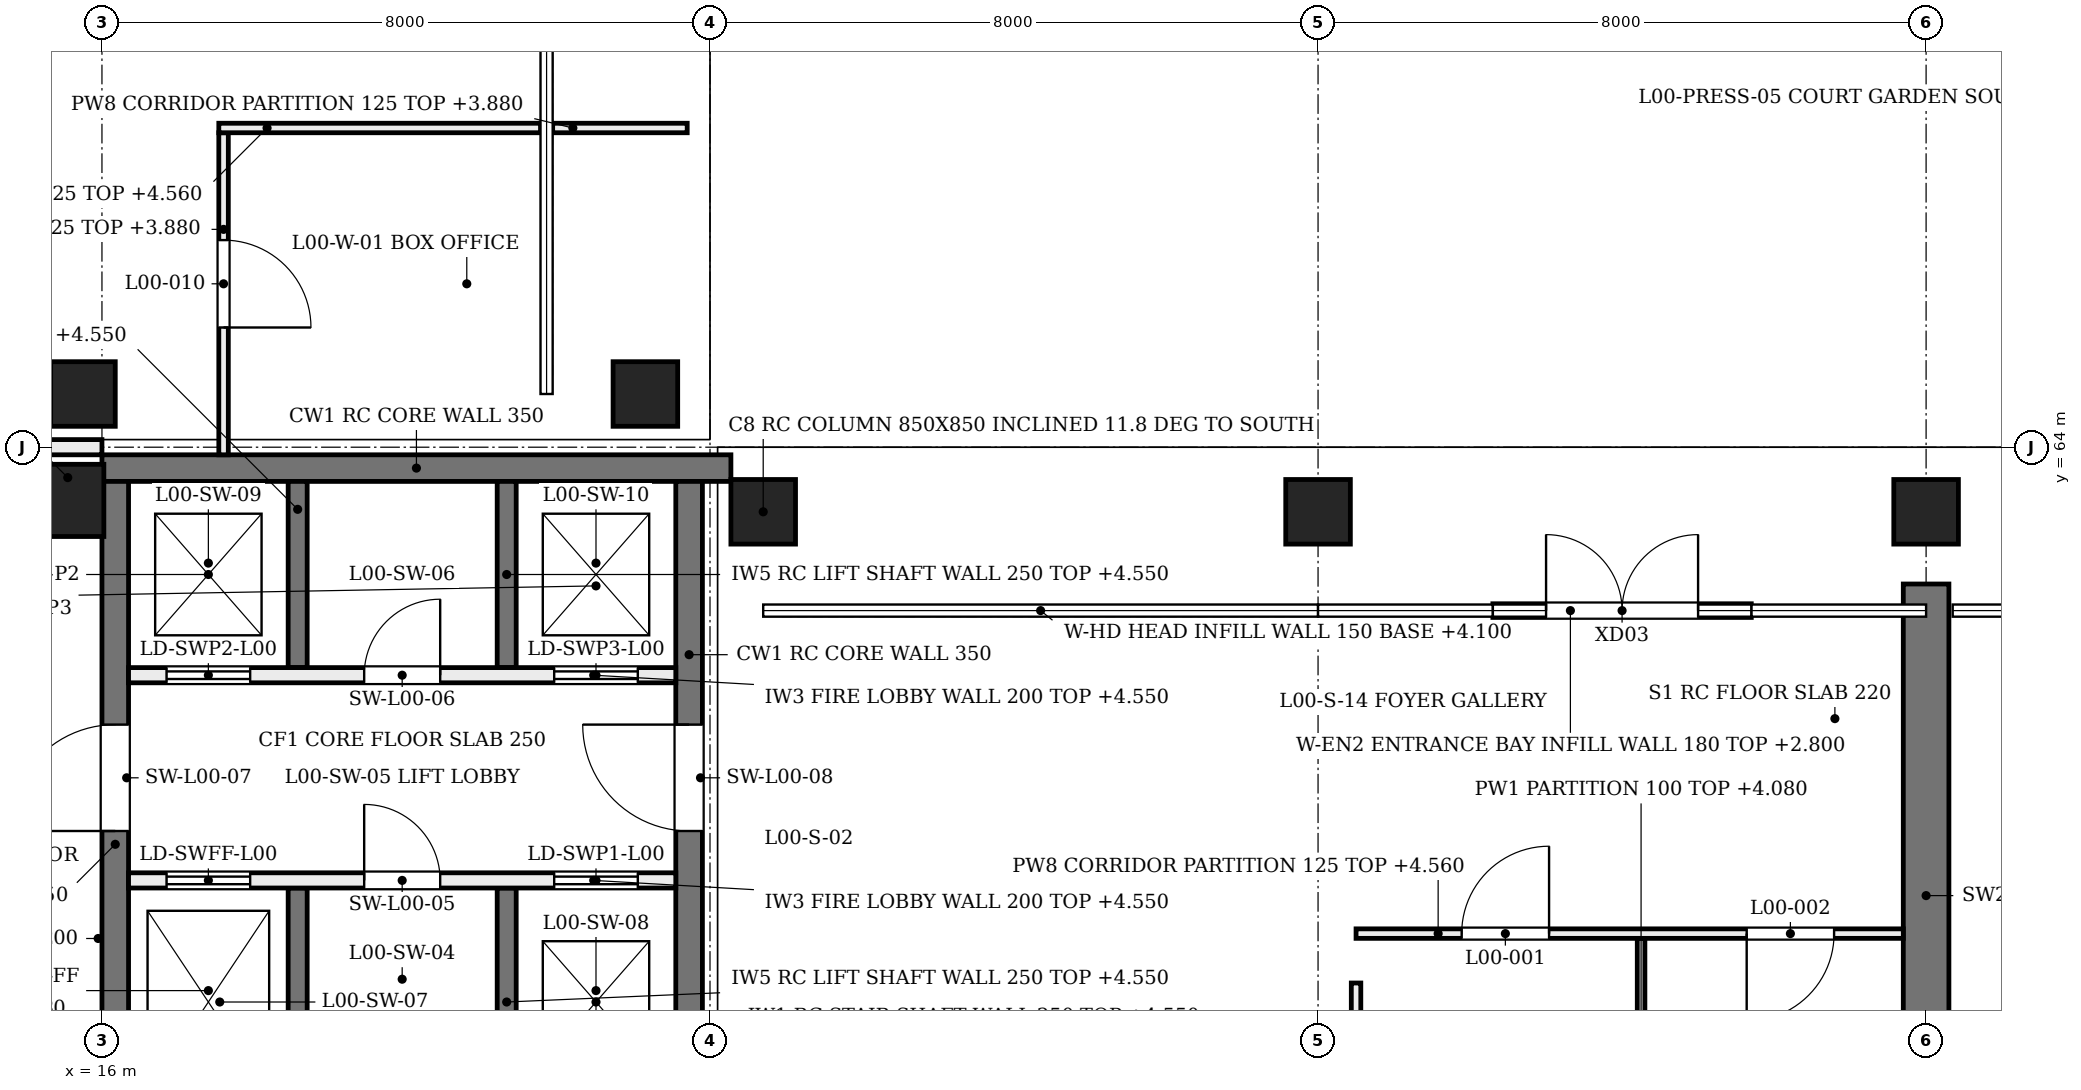
"""IFC4 building model, lengths in metres.
Left out: names, types, materials, properties, quantities, classifications, styles, units other than length and angle.
Written with IfcOpenShell. Run it as: python <this file> out.ifc"""

import sys

from ifc_helpers import new_model, si_unit, direction, frame, frame_2d, origin, origin_2d, place, context, subcontext, project, spatial, rectangle, extrude, element, fill, save


model = new_model("IFC4")
c1 = context("Model", 3, precision=1e-05, world=origin(), true_north=direction((0.0, 1.0)))
c2 = subcontext(c1, "Body", "Model", "MODEL_VIEW")
j1 = project(units=[si_unit("LENGTHUNIT", "METRE"), si_unit("PLANEANGLEUNIT", "RADIAN")], contexts=[c1])
p1 = place(None, origin())
s1 = spatial("IfcSite", under=j1, at=p1, CompositionType="ELEMENT")
p2 = place(p1, origin())
s2 = spatial("IfcBuilding", under=s1, at=p2, CompositionType="ELEMENT")
p3 = place(p2, origin())
s3 = spatial("IfcBuildingStorey", under=s2, at=p3, CompositionType="ELEMENT", Elevation=0.0)
p4 = place(p3, frame((40.0, 49.2, 0.0), z_axis=(0.0, 0.0, 1.0), x_axis=(0.0, 1.0, 0.0)))
e1 = element("IfcWall", 1, at=p4, inside=s3, PredefinedType="SHEAR", context=c2, shape_type="SweptSolid", body=[
    extrude(rectangle(XDim=13.0, YDim=0.6, at=frame_2d((6.5, 0.0))), origin(), (0.0, 0.0, 1.0), 4.58),
])
p5 = place(p3, frame((16.0, 63.725, 0.0), z_axis=(0.0, 0.0, 1.0), x_axis=(1.0, 0.0, 0.0)))
e2 = element("IfcWall", 2, at=p5, inside=s3, PredefinedType="SHEAR", context=c2, shape_type="SweptSolid", body=[
    extrude(rectangle(XDim=8.275, YDim=0.35, at=frame_2d((4.137, 0.0))), origin(), (0.0, 0.0, 1.0), 4.58),
])
p6 = place(p3, frame((16.175, 48.35, 0.0), z_axis=(0.0, 0.0, 1.0), x_axis=(0.0, 1.0, 0.0)))
e3 = element("IfcWall", 3, at=p6, inside=s3, PredefinedType="SHEAR", context=c2, shape_type="SweptSolid", body=[
    extrude(rectangle(XDim=15.2, YDim=0.35, at=frame_2d((7.6, 0.0))), origin(), (0.0, 0.0, 1.0), 4.58),
])
p7 = place(p6, frame((0.95, 0.0, 0.0)))
e4 = element("IfcOpeningElement", 4, at=p7, cuts=e3, PredefinedType="OPENING", context=c2, shape_type="SweptSolid", body=[
    extrude(rectangle(XDim=1.0, YDim=2.1, at=frame_2d((0.5, 1.05))), frame((0.0, 0.185, 0.0), z_axis=(0.0, -1.0, 0.0), x_axis=(1.0, 0.0, 0.0)), (0.0, 0.0, 1.0), 0.37),
])
p8 = place(p6, frame((10.6, 0.0, 0.0)))
e5 = element("IfcOpeningElement", 5, at=p8, cuts=e3, PredefinedType="OPENING", context=c2, shape_type="SweptSolid", body=[
    extrude(rectangle(XDim=1.4, YDim=2.1, at=frame_2d((0.7, 1.05))), frame((0.0, 0.185, 0.0), z_axis=(0.0, -1.0, 0.0), x_axis=(1.0, 0.0, 0.0)), (0.0, 0.0, 1.0), 0.37),
])
p9 = place(p3, frame((23.725, 48.35, 0.0), z_axis=(0.0, 0.0, 1.0), x_axis=(0.0, 1.0, 0.0)))
e6 = element("IfcWall", 6, at=p9, inside=s3, PredefinedType="SHEAR", context=c2, shape_type="SweptSolid", body=[
    extrude(rectangle(XDim=15.2, YDim=0.35, at=frame_2d((7.6, 0.0))), origin(), (0.0, 0.0, 1.0), 4.58),
])
p10 = place(p9, frame((0.95, 0.0, 0.0)))
e7 = element("IfcOpeningElement", 7, at=p10, cuts=e6, PredefinedType="OPENING", context=c2, shape_type="SweptSolid", body=[
    extrude(rectangle(XDim=1.0, YDim=2.1, at=frame_2d((0.5, 1.05))), frame((0.0, 0.185, 0.0), z_axis=(0.0, -1.0, 0.0), x_axis=(1.0, 0.0, 0.0)), (0.0, 0.0, 1.0), 0.37),
])
p11 = place(p9, frame((10.6, 0.0, 0.0)))
e8 = element("IfcOpeningElement", 8, at=p11, cuts=e6, PredefinedType="OPENING", context=c2, shape_type="SweptSolid", body=[
    extrude(rectangle(XDim=1.4, YDim=2.1, at=frame_2d((0.7, 1.05))), frame((0.0, 0.185, 0.0), z_axis=(0.0, -1.0, 0.0), x_axis=(1.0, 0.0, 0.0)), (0.0, 0.0, 1.0), 0.37),
])
p12 = place(p3, frame((15.55, 63.3, 0.0), z_axis=(0.0, 0.0, 1.0), x_axis=(1.0, 0.0, 0.0)))
e9 = element("IfcColumn", 9, at=p12, inside=s3, PredefinedType="COLUMN", context=c2, shape_type="SweptSolid", body=[
    extrude(rectangle(XDim=0.95, YDim=0.95, at=origin_2d()), origin(), (0.0, 0.0, 1.0), 4.8),
])
for number, where, z_axis, x_axis in (
    (10, (24.7, 63.4, 0.0), (0.0, -0.204, 0.979), (1.0, 0.0, 0.0)),
    (11, (32.0, 63.4, 0.0), (0.0, -0.204, 0.979), (1.0, 0.0, 0.0)),
    (12, (40.0, 63.4, 0.0), (0.0, -0.204, 0.979), (1.0, 0.0, 0.0)),
):
    element("IfcColumn", number, at=place(p3, frame(where, z_axis=z_axis, x_axis=x_axis)), inside=s3, PredefinedType="COLUMN", context=c2, shape_type="SweptSolid", body=[
        extrude(rectangle(XDim=0.85, YDim=0.85, at=origin_2d()), origin(), (0.0, 0.0, 1.0), 4.903),
    ])
for number, where, z_axis, x_axis in (
    (13, (16.333, 64.7, -1.6), (-0.204, 0.0, 0.979), (0.0, -1.0, 0.0)),
    (14, (23.733, 64.7, -1.6), (-0.204, 0.0, 0.979), (0.0, -1.0, 0.0)),
):
    element("IfcColumn", number, at=place(p3, frame(where, z_axis=z_axis, x_axis=x_axis)), inside=s3, PredefinedType="COLUMN", context=c2, shape_type="SweptSolid", body=[
        extrude(rectangle(XDim=0.85, YDim=0.85, at=origin_2d()), origin(), (0.0, 0.0, 1.0), 6.538),
    ])
p13 = place(p3, frame((34.3, 61.85, 0.0), z_axis=(0.0, 0.0, 1.0), x_axis=(1.0, 0.0, 0.0)))
e15 = element("IfcWall", 15, at=p13, inside=s3, PredefinedType="SOLIDWALL", context=c2, shape_type="SweptSolid", body=[
    extrude(rectangle(XDim=3.4, YDim=0.18, at=frame_2d((1.7, 0.0))), origin(), (0.0, 0.0, 1.0), 2.8),
])
p14 = place(p13, frame((0.7, 0.0, 0.0)))
e16 = element("IfcOpeningElement", 16, at=p14, cuts=e15, PredefinedType="OPENING", context=c2, shape_type="SweptSolid", body=[
    extrude(rectangle(XDim=2.0, YDim=2.4, at=frame_2d((1.0, 1.2))), frame((0.0, 0.1, 0.0), z_axis=(0.0, -1.0, 0.0), x_axis=(1.0, 0.0, 0.0)), (0.0, 0.0, 1.0), 0.2),
])
for number, where, z_axis, x_axis in (
    (17, (24.9, 61.85, 4.1), (0.0, 0.0, 1.0), (1.0, 0.0, 0.0)),
    (18, (21.85, 64.9, 4.1), (0.0, 0.0, 1.0), (0.0, 1.0, 0.0)),
):
    element("IfcWall", number, at=place(p3, frame(where, z_axis=z_axis, x_axis=x_axis)), inside=s3, PredefinedType="SOLIDWALL", context=c2, shape_type="SweptSolid", body=[
        extrude(rectangle(XDim=6.9, YDim=0.15, at=frame_2d((3.45, 0.0))), origin(), (0.0, 0.0, 1.0), 0.48),
    ])
p15 = place(p3, frame((18.575, 55.2, 0.0), z_axis=(0.0, 0.0, 1.0), x_axis=(0.0, 1.0, 0.0)))
e19 = element("IfcWall", 19, at=p15, inside=s3, PredefinedType="SOLIDWALL", context=c2, shape_type="SweptSolid", body=[
    extrude(rectangle(XDim=3.0, YDim=0.25, at=frame_2d((1.5, 0.0))), origin(), (0.0, 0.0, 1.0), 4.55),
])
p16 = place(p3, frame((18.575, 61.1, 0.0), z_axis=(0.0, 0.0, 1.0), x_axis=(0.0, 1.0, 0.0)))
e20 = element("IfcWall", 20, at=p16, inside=s3, PredefinedType="SOLIDWALL", context=c2, shape_type="SweptSolid", body=[
    extrude(rectangle(XDim=2.45, YDim=0.25, at=frame_2d((1.225, 0.0))), origin(), (0.0, 0.0, 1.0), 4.55),
])
p17 = place(p3, frame((21.325, 55.2, 0.0), z_axis=(0.0, 0.0, 1.0), x_axis=(0.0, 1.0, 0.0)))
e21 = element("IfcWall", 21, at=p17, inside=s3, PredefinedType="SOLIDWALL", context=c2, shape_type="SweptSolid", body=[
    extrude(rectangle(XDim=3.0, YDim=0.25, at=frame_2d((1.5, 0.0))), origin(), (0.0, 0.0, 1.0), 4.55),
])
p18 = place(p3, frame((21.325, 61.1, 0.0), z_axis=(0.0, 0.0, 1.0), x_axis=(0.0, 1.0, 0.0)))
e22 = element("IfcWall", 22, at=p18, inside=s3, PredefinedType="SOLIDWALL", context=c2, shape_type="SweptSolid", body=[
    extrude(rectangle(XDim=2.45, YDim=0.25, at=frame_2d((1.225, 0.0))), origin(), (0.0, 0.0, 1.0), 4.55),
])
p19 = place(p3, frame((16.35, 58.3, 0.0), z_axis=(0.0, 0.0, 1.0), x_axis=(1.0, 0.0, 0.0)))
e23 = element("IfcWall", 23, at=p19, inside=s3, PredefinedType="SOLIDWALL", context=c2, shape_type="SweptSolid", body=[
    extrude(rectangle(XDim=7.2, YDim=0.2, at=frame_2d((3.6, 0.0))), origin(), (0.0, 0.0, 1.0), 4.55),
])
p20 = place(p19, frame((0.5, 0.0, 0.0)))
e24 = element("IfcOpeningElement", 24, at=p20, cuts=e23, PredefinedType="OPENING", context=c2, shape_type="SweptSolid", body=[
    extrude(rectangle(XDim=1.1, YDim=2.1, at=frame_2d((0.55, 1.05))), frame((0.0, 0.11, 0.0), z_axis=(0.0, -1.0, 0.0), x_axis=(1.0, 0.0, 0.0)), (0.0, 0.0, 1.0), 0.22),
])
p21 = place(p19, frame((5.6, 0.0, 0.0)))
e25 = element("IfcOpeningElement", 25, at=p21, cuts=e23, PredefinedType="OPENING", context=c2, shape_type="SweptSolid", body=[
    extrude(rectangle(XDim=1.1, YDim=2.1, at=frame_2d((0.55, 1.05))), frame((0.0, 0.11, 0.0), z_axis=(0.0, -1.0, 0.0), x_axis=(1.0, 0.0, 0.0)), (0.0, 0.0, 1.0), 0.22),
])
p22 = place(p19, frame((3.1, 0.0, 0.0)))
e26 = element("IfcOpeningElement", 26, at=p22, cuts=e23, PredefinedType="OPENING", context=c2, shape_type="SweptSolid", body=[
    extrude(rectangle(XDim=1.0, YDim=2.1, at=frame_2d((0.5, 1.05))), frame((0.0, 0.11, 0.0), z_axis=(0.0, -1.0, 0.0), x_axis=(1.0, 0.0, 0.0)), (0.0, 0.0, 1.0), 0.22),
])
p23 = place(p3, frame((16.35, 61.0, 0.0), z_axis=(0.0, 0.0, 1.0), x_axis=(1.0, 0.0, 0.0)))
e27 = element("IfcWall", 27, at=p23, inside=s3, PredefinedType="SOLIDWALL", context=c2, shape_type="SweptSolid", body=[
    extrude(rectangle(XDim=7.2, YDim=0.2, at=frame_2d((3.6, 0.0))), origin(), (0.0, 0.0, 1.0), 4.55),
])
p24 = place(p23, frame((0.5, 0.0, 0.0)))
e28 = element("IfcOpeningElement", 28, at=p24, cuts=e27, PredefinedType="OPENING", context=c2, shape_type="SweptSolid", body=[
    extrude(rectangle(XDim=1.1, YDim=2.1, at=frame_2d((0.55, 1.05))), frame((0.0, 0.11, 0.0), z_axis=(0.0, -1.0, 0.0), x_axis=(1.0, 0.0, 0.0)), (0.0, 0.0, 1.0), 0.22),
])
p25 = place(p23, frame((5.6, 0.0, 0.0)))
e29 = element("IfcOpeningElement", 29, at=p25, cuts=e27, PredefinedType="OPENING", context=c2, shape_type="SweptSolid", body=[
    extrude(rectangle(XDim=1.1, YDim=2.1, at=frame_2d((0.55, 1.05))), frame((0.0, 0.11, 0.0), z_axis=(0.0, -1.0, 0.0), x_axis=(1.0, 0.0, 0.0)), (0.0, 0.0, 1.0), 0.22),
])
p26 = place(p23, frame((3.1, 0.0, 0.0)))
e30 = element("IfcOpeningElement", 30, at=p26, cuts=e27, PredefinedType="OPENING", context=c2, shape_type="SweptSolid", body=[
    extrude(rectangle(XDim=1.0, YDim=2.1, at=frame_2d((0.5, 1.05))), frame((0.0, 0.11, 0.0), z_axis=(0.0, -1.0, 0.0), x_axis=(1.0, 0.0, 0.0)), (0.0, 0.0, 1.0), 0.22),
])
p27 = place(p3, frame((32.5, 51.8, 0.0), z_axis=(0.0, 0.0, 1.0), x_axis=(0.0, 1.0, 0.0)))
e31 = element("IfcWall", 31, at=p27, inside=s3, PredefinedType="PARTITIONING", context=c2, shape_type="SweptSolid", body=[
    extrude(rectangle(XDim=5.15, YDim=0.125, at=frame_2d((2.575, 0.0))), origin(), (0.0, 0.0, 1.0), 4.08),
])
p28 = place(p3, frame((36.25, 50.655, 0.0), z_axis=(0.0, 0.0, 1.0), x_axis=(0.0, 1.0, 0.0)))
e32 = element("IfcWall", 32, at=p28, inside=s3, PredefinedType="PARTITIONING", context=c2, shape_type="SweptSolid", body=[
    extrude(rectangle(XDim=6.883, YDim=0.1, at=frame_2d((3.441, 0.0))), origin(), (0.0, 0.0, 1.0), 4.08),
])
p29 = place(p3, frame((32.5, 57.6, 0.0), z_axis=(0.0, 0.0, 1.0), x_axis=(1.0, 0.0, 0.0)))
e33 = element("IfcWall", 33, at=p29, inside=s3, PredefinedType="PARTITIONING", context=c2, shape_type="SweptSolid", body=[
    extrude(rectangle(XDim=7.2, YDim=0.125, at=frame_2d((3.6, 0.0))), origin(), (0.0, 0.0, 1.0), 4.56),
])
p30 = place(p29, frame((1.389, 0.0, 0.0)))
e34 = element("IfcOpeningElement", 34, at=p30, cuts=e33, PredefinedType="OPENING", context=c2, shape_type="SweptSolid", body=[
    extrude(rectangle(XDim=1.15, YDim=2.1, at=frame_2d((0.575, 1.05))), frame((0.0, 0.073, 0.0), z_axis=(0.0, -1.0, 0.0), x_axis=(1.0, 0.0, 0.0)), (0.0, 0.0, 1.0), 0.145),
])
p31 = place(p29, frame((5.139, 0.0, 0.0)))
e35 = element("IfcOpeningElement", 35, at=p31, cuts=e33, PredefinedType="OPENING", context=c2, shape_type="SweptSolid", body=[
    extrude(rectangle(XDim=1.15, YDim=2.1, at=frame_2d((0.575, 1.05))), frame((0.0, 0.073, 0.0), z_axis=(0.0, -1.0, 0.0), x_axis=(1.0, 0.0, 0.0)), (0.0, 0.0, 1.0), 0.145),
])
p32 = place(p3, frame((17.6, 63.9, 0.0), z_axis=(0.0, 0.0, 1.0), x_axis=(0.0, 1.0, 0.0)))
e36 = element("IfcWall", 36, at=p32, inside=s3, PredefinedType="PARTITIONING", context=c2, shape_type="SweptSolid", body=[
    extrude(rectangle(XDim=4.238, YDim=0.125, at=frame_2d((2.119, 0.0))), origin(), (0.0, 0.0, 1.0), 3.88),
])
p33 = place(p32, frame((1.675, 0.0, 0.0)))
e37 = element("IfcOpeningElement", 37, at=p33, cuts=e36, PredefinedType="OPENING", context=c2, shape_type="SweptSolid", body=[
    extrude(rectangle(XDim=1.15, YDim=2.1, at=frame_2d((0.575, 1.05))), frame((0.0, 0.073, 0.0), z_axis=(0.0, -1.0, 0.0), x_axis=(1.0, 0.0, 0.0)), (0.0, 0.0, 1.0), 0.145),
])
p34 = place(p3, frame((17.538, 68.2, 0.0), z_axis=(0.0, 0.0, 1.0), x_axis=(1.0, 0.0, 0.0)))
e38 = element("IfcWall", 38, at=p34, inside=s3, PredefinedType="PARTITIONING", context=c2, shape_type="SweptSolid", body=[
    extrude(rectangle(XDim=4.232, YDim=0.125, at=frame_2d((2.116, 0.0))), origin(), (0.0, 0.0, 1.0), 4.56),
])
p35 = place(p3, frame((21.93, 68.2, 0.0), z_axis=(0.0, 0.0, 1.0), x_axis=(1.0, 0.0, 0.0)))
e39 = element("IfcWall", 39, at=p35, inside=s3, PredefinedType="PARTITIONING", context=c2, shape_type="SweptSolid", body=[
    extrude(rectangle(XDim=1.77, YDim=0.125, at=frame_2d((0.885, 0.0))), origin(), (0.0, 0.0, 1.0), 3.88),
])
p36 = place(p3, frame((12.4, 64.0, 0.0), z_axis=(0.0, 0.0, 1.0), x_axis=(1.0, 0.0, 0.0)))
e40 = element("IfcWall", 40, at=p36, inside=s3, PredefinedType="PARTITIONING", context=c2, shape_type="SweptSolid", body=[
    extrude(rectangle(XDim=3.6, YDim=0.2, at=frame_2d((1.8, 0.0))), origin(), (0.0, 0.0, 1.0), 3.88),
])
p37 = place(p36, frame((1.05, 0.0, 0.0)))
e41 = element("IfcOpeningElement", 41, at=p37, cuts=e40, PredefinedType="OPENING", context=c2, shape_type="SweptSolid", body=[
    extrude(rectangle(XDim=1.0, YDim=2.1, at=frame_2d((0.5, 1.05))), frame((0.0, 0.11, 0.0), z_axis=(0.0, -1.0, 0.0), x_axis=(1.0, 0.0, 0.0)), (0.0, 0.0, 1.0), 0.22),
])
p38 = place(p14, origin())
e42 = element("IfcDoor", 42, at=p38, inside=s3, OperationType="SINGLE_SWING_LEFT", PredefinedType="DOOR", context=c2, shape_type="SweptSolid", body=[
    extrude(rectangle(XDim=2.0, YDim=2.4, at=frame_2d((1.0, 1.2))), frame((0.0, 0.025, 0.0), z_axis=(0.0, -1.0, 0.0), x_axis=(1.0, 0.0, 0.0)), (0.0, 0.0, 1.0), 0.05),
])
fill(e16, e42)
p39 = place(p20, origin())
e43 = element("IfcDoor", 43, at=p39, inside=s3, OperationType="DOUBLE_DOOR_SLIDING", PredefinedType="DOOR", context=c2, shape_type="SweptSolid", body=[
    extrude(rectangle(XDim=1.1, YDim=2.1, at=frame_2d((0.55, 1.05))), frame((0.0, 0.025, 0.0), z_axis=(0.0, -1.0, 0.0), x_axis=(1.0, 0.0, 0.0)), (0.0, 0.0, 1.0), 0.05),
])
fill(e24, e43)
p40 = place(p21, origin())
e44 = element("IfcDoor", 44, at=p40, inside=s3, OperationType="DOUBLE_DOOR_SLIDING", PredefinedType="DOOR", context=c2, shape_type="SweptSolid", body=[
    extrude(rectangle(XDim=1.1, YDim=2.1, at=frame_2d((0.55, 1.05))), frame((0.0, 0.025, 0.0), z_axis=(0.0, -1.0, 0.0), x_axis=(1.0, 0.0, 0.0)), (0.0, 0.0, 1.0), 0.05),
])
fill(e25, e44)
p41 = place(p24, frame((1.1, 0.0, 0.0), z_axis=(0.0, 0.0, 1.0), x_axis=(-1.0, 0.0, 0.0)))
e45 = element("IfcDoor", 45, at=p41, inside=s3, OperationType="DOUBLE_DOOR_SLIDING", PredefinedType="DOOR", context=c2, shape_type="SweptSolid", body=[
    extrude(rectangle(XDim=1.1, YDim=2.1, at=frame_2d((0.55, 1.05))), frame((0.0, 0.025, 0.0), z_axis=(0.0, -1.0, 0.0), x_axis=(1.0, 0.0, 0.0)), (0.0, 0.0, 1.0), 0.05),
])
fill(e28, e45)
p42 = place(p25, frame((1.1, 0.0, 0.0), z_axis=(0.0, 0.0, 1.0), x_axis=(-1.0, 0.0, 0.0)))
e46 = element("IfcDoor", 46, at=p42, inside=s3, OperationType="DOUBLE_DOOR_SLIDING", PredefinedType="DOOR", context=c2, shape_type="SweptSolid", body=[
    extrude(rectangle(XDim=1.1, YDim=2.1, at=frame_2d((0.55, 1.05))), frame((0.0, 0.025, 0.0), z_axis=(0.0, -1.0, 0.0), x_axis=(1.0, 0.0, 0.0)), (0.0, 0.0, 1.0), 0.05),
])
fill(e29, e46)
p43 = place(p22, origin())
e47 = element("IfcDoor", 47, at=p43, inside=s3, OperationType="SINGLE_SWING_LEFT", PredefinedType="DOOR", context=c2, shape_type="SweptSolid", body=[
    extrude(rectangle(XDim=1.0, YDim=2.1, at=frame_2d((0.5, 1.05))), frame((0.0, 0.025, 0.0), z_axis=(0.0, -1.0, 0.0), x_axis=(1.0, 0.0, 0.0)), (0.0, 0.0, 1.0), 0.05),
])
fill(e26, e47)
p44 = place(p26, frame((1.0, 0.0, 0.0), z_axis=(0.0, 0.0, 1.0), x_axis=(-1.0, 0.0, 0.0)))
e48 = element("IfcDoor", 48, at=p44, inside=s3, OperationType="SINGLE_SWING_RIGHT", PredefinedType="DOOR", context=c2, shape_type="SweptSolid", body=[
    extrude(rectangle(XDim=1.0, YDim=2.1, at=frame_2d((0.5, 1.05))), frame((0.0, 0.025, 0.0), z_axis=(0.0, -1.0, 0.0), x_axis=(1.0, 0.0, 0.0)), (0.0, 0.0, 1.0), 0.05),
])
fill(e30, e48)
p45 = place(p8, origin())
e49 = element("IfcDoor", 49, at=p45, inside=s3, OperationType="SINGLE_SWING_LEFT", PredefinedType="DOOR", context=c2, shape_type="SweptSolid", body=[
    extrude(rectangle(XDim=1.4, YDim=2.1, at=frame_2d((0.7, 1.05))), frame((0.0, 0.025, 0.0), z_axis=(0.0, -1.0, 0.0), x_axis=(1.0, 0.0, 0.0)), (0.0, 0.0, 1.0), 0.05),
])
fill(e5, e49)
p46 = place(p11, frame((1.4, 0.0, 0.0), z_axis=(0.0, 0.0, 1.0), x_axis=(-1.0, 0.0, 0.0)))
e50 = element("IfcDoor", 50, at=p46, inside=s3, OperationType="SINGLE_SWING_RIGHT", PredefinedType="DOOR", context=c2, shape_type="SweptSolid", body=[
    extrude(rectangle(XDim=1.4, YDim=2.1, at=frame_2d((0.7, 1.05))), frame((0.0, 0.025, 0.0), z_axis=(0.0, -1.0, 0.0), x_axis=(1.0, 0.0, 0.0)), (0.0, 0.0, 1.0), 0.05),
])
fill(e8, e50)
p47 = place(p30, frame((1.15, 0.0, 0.0), z_axis=(0.0, 0.0, 1.0), x_axis=(-1.0, 0.0, 0.0)))
e51 = element("IfcDoor", 51, at=p47, inside=s3, OperationType="SINGLE_SWING_RIGHT", PredefinedType="DOOR", context=c2, shape_type="SweptSolid", body=[
    extrude(rectangle(XDim=1.15, YDim=2.1, at=frame_2d((0.575, 1.05))), frame((0.0, 0.025, 0.0), z_axis=(0.0, -1.0, 0.0), x_axis=(1.0, 0.0, 0.0)), (0.0, 0.0, 1.0), 0.05),
])
fill(e34, e51)
p48 = place(p31, frame((1.15, 0.0, 0.0), z_axis=(0.0, 0.0, 1.0), x_axis=(-1.0, 0.0, 0.0)))
e52 = element("IfcDoor", 52, at=p48, inside=s3, OperationType="SINGLE_SWING_LEFT", PredefinedType="DOOR", context=c2, shape_type="SweptSolid", body=[
    extrude(rectangle(XDim=1.15, YDim=2.1, at=frame_2d((0.575, 1.05))), frame((0.0, 0.025, 0.0), z_axis=(0.0, -1.0, 0.0), x_axis=(1.0, 0.0, 0.0)), (0.0, 0.0, 1.0), 0.05),
])
fill(e35, e52)
p49 = place(p33, frame((1.15, 0.0, 0.0), z_axis=(0.0, 0.0, 1.0), x_axis=(-1.0, 0.0, 0.0)))
e53 = element("IfcDoor", 53, at=p49, inside=s3, OperationType="SINGLE_SWING_LEFT", PredefinedType="DOOR", context=c2, shape_type="SweptSolid", body=[
    extrude(rectangle(XDim=1.15, YDim=2.1, at=frame_2d((0.575, 1.05))), frame((0.0, 0.025, 0.0), z_axis=(0.0, -1.0, 0.0), x_axis=(1.0, 0.0, 0.0)), (0.0, 0.0, 1.0), 0.05),
])
fill(e37, e53)
save(model, sys.argv[1])
